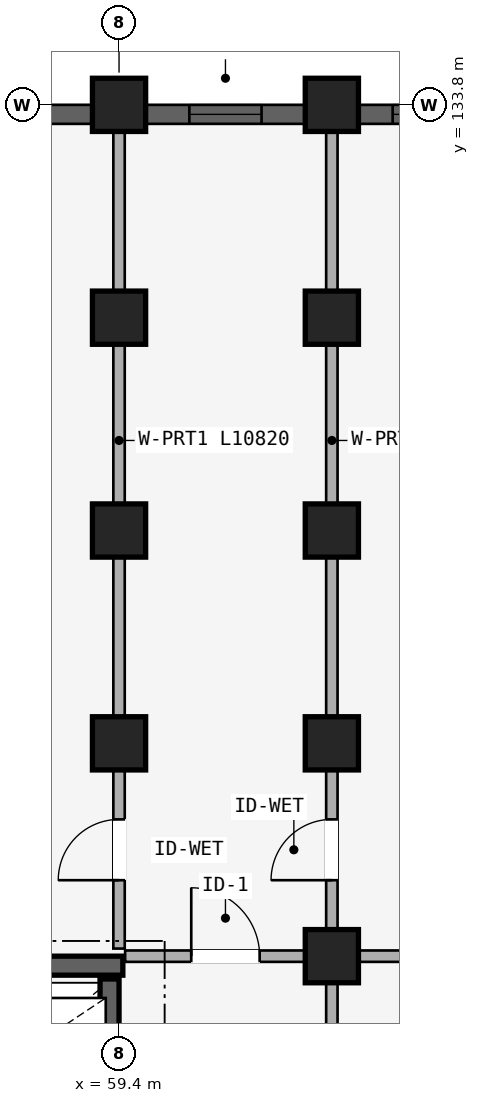
"""IFC4 building model, lengths in metres.
Left out: names, types, materials, properties, quantities, classifications, styles, units other than length and angle.
Written with IfcOpenShell. Run it as: python <this file> out.ifc"""

import sys

from ifc_helpers import new_model, si_unit, direction, frame, frame_2d, origin, origin_2d, place, context, subcontext, project, spatial, rectangle, extrude, element, fill, save


model = new_model("IFC4")
c1 = context("Model", 3, precision=1e-05, world=origin(), true_north=direction((0.0, 1.0)))
c2 = subcontext(c1, "Body", "Model", "MODEL_VIEW")
j1 = project(units=[si_unit("LENGTHUNIT", "METRE"), si_unit("PLANEANGLEUNIT", "RADIAN")], contexts=[c1])
p1 = place(None, origin())
s1 = spatial("IfcSite", under=j1, at=p1, CompositionType="ELEMENT")
p2 = place(p1, origin())
s2 = spatial("IfcBuilding", under=s1, at=p2, CompositionType="ELEMENT")
p3 = place(p2, frame((0.0, 0.0, 27.6)))
s3 = spatial("IfcBuildingStorey", under=s2, at=p3, CompositionType="ELEMENT", Elevation=27.6)
p4 = place(p3, frame((56.65, 122.475, 0.0), z_axis=(0.0, 0.0, 1.0), x_axis=(1.0, 0.0, 0.0)))
e1 = element("IfcWall", 1, at=p4, inside=s3, PredefinedType="SHEAR", context=c2, shape_type="SweptSolid", body=[
    extrude(rectangle(XDim=2.8, YDim=0.25, at=frame_2d((1.4, 0.0))), origin(), (0.0, 0.0, 1.0), 2.93),
])
p5 = place(p3, frame((59.275, 120.15, 0.0), z_axis=(0.0, 0.0, 1.0), x_axis=(0.0, 1.0, 0.0)))
e2 = element("IfcWall", 2, at=p5, inside=s3, PredefinedType="SHEAR", context=c2, shape_type="SweptSolid", body=[
    extrude(rectangle(XDim=2.15, YDim=0.25, at=frame_2d((1.075, 0.0))), origin(), (0.0, 0.0, 1.0), 2.93),
])
for number, where, z_axis, x_axis in (
    (3, (59.4, 125.4, 0.0), (0.0, 0.0, 1.0), (1.0, 0.0, 0.0)),
    (4, (59.4, 128.2, 0.0), (0.0, 0.0, 1.0), (1.0, 0.0, 0.0)),
    (5, (59.4, 131.0, 0.0), (0.0, 0.0, 1.0), (1.0, 0.0, 0.0)),
    (6, (59.4, 133.8, 0.0), (0.0, 0.0, 1.0), (1.0, 0.0, 0.0)),
    (7, (62.2, 122.6, 0.0), (0.0, 0.0, 1.0), (1.0, 0.0, 0.0)),
    (8, (62.2, 125.4, 0.0), (0.0, 0.0, 1.0), (1.0, 0.0, 0.0)),
    (9, (62.2, 128.2, 0.0), (0.0, 0.0, 1.0), (1.0, 0.0, 0.0)),
    (10, (62.2, 131.0, 0.0), (0.0, 0.0, 1.0), (1.0, 0.0, 0.0)),
    (11, (62.2, 133.8, 0.0), (0.0, 0.0, 1.0), (1.0, 0.0, 0.0)),
):
    element("IfcColumn", number, at=place(p3, frame(where, z_axis=z_axis, x_axis=x_axis)), inside=s3, PredefinedType="COLUMN", context=c2, shape_type="SweptSolid", body=[
        extrude(rectangle(XDim=0.7, YDim=0.7, at=origin_2d()), origin(), (0.0, 0.0, 1.0), 2.93),
    ])
p6 = place(p3, frame((59.48, 122.6, 0.0), z_axis=(0.0, 0.0, 1.0), x_axis=(1.0, 0.0, 0.0)))
e12 = element("IfcWall", 12, at=p6, inside=s3, PredefinedType="PLUMBINGWALL", context=c2, shape_type="SweptSolid", body=[
    extrude(rectangle(XDim=2.64, YDim=0.15, at=frame_2d((1.32, 0.0))), origin(), (0.0, 0.0, 1.0), 2.372),
])
p7 = place(p6, frame((0.87, 0.0, 0.0)))
e13 = element("IfcOpeningElement", 13, at=p7, cuts=e12, PredefinedType="OPENING", context=c2, shape_type="SweptSolid", body=[
    extrude(rectangle(XDim=0.9, YDim=2.1, at=frame_2d((0.45, 1.05))), frame((0.0, 0.085, 0.0), z_axis=(0.0, -1.0, 0.0), x_axis=(1.0, 0.0, 0.0)), (0.0, 0.0, 1.0), 0.17),
])
p8 = place(p3, frame((62.28, 122.6, 0.0), z_axis=(0.0, 0.0, 1.0), x_axis=(1.0, 0.0, 0.0)))
e14 = element("IfcWall", 14, at=p8, inside=s3, PredefinedType="PLUMBINGWALL", context=c2, shape_type="SweptSolid", body=[
    extrude(rectangle(XDim=2.64, YDim=0.15, at=frame_2d((1.32, 0.0))), origin(), (0.0, 0.0, 1.0), 2.372),
])
p9 = place(p8, frame((0.92, 0.0, 0.0)))
e15 = element("IfcOpeningElement", 15, at=p9, cuts=e14, PredefinedType="OPENING", context=c2, shape_type="SweptSolid", body=[
    extrude(rectangle(XDim=0.8, YDim=2.1, at=frame_2d((0.4, 1.05))), frame((0.0, 0.085, 0.0), z_axis=(0.0, -1.0, 0.0), x_axis=(1.0, 0.0, 0.0)), (0.0, 0.0, 1.0), 0.17),
])
p10 = place(p3, frame((59.4, 122.7, 0.0), z_axis=(0.0, 0.0, 1.0), x_axis=(0.0, 1.0, 0.0)))
e16 = element("IfcWall", 16, at=p10, inside=s3, PredefinedType="PARTITIONING", context=c2, shape_type="SweptSolid", body=[
    extrude(rectangle(XDim=10.82, YDim=0.15, at=frame_2d((5.41, 0.0))), origin(), (0.0, 0.0, 1.0), 2.372),
])
p11 = place(p10, frame((0.899, 0.0, 0.0)))
e17 = element("IfcOpeningElement", 17, at=p11, cuts=e16, PredefinedType="OPENING", context=c2, shape_type="SweptSolid", body=[
    extrude(rectangle(XDim=0.8, YDim=2.1, at=frame_2d((0.4, 1.05))), frame((0.0, 0.085, 0.0), z_axis=(0.0, -1.0, 0.0), x_axis=(1.0, 0.0, 0.0)), (0.0, 0.0, 1.0), 0.17),
])
p12 = place(p3, frame((62.2, 116.05, 0.0), z_axis=(0.0, 0.0, 1.0), x_axis=(0.0, 1.0, 0.0)))
e18 = element("IfcWall", 18, at=p12, inside=s3, PredefinedType="PARTITIONING", context=c2, shape_type="SweptSolid", body=[
    extrude(rectangle(XDim=6.53, YDim=0.15, at=frame_2d((3.265, 0.0))), origin(), (0.0, 0.0, 1.0), 2.372),
])
p13 = place(p12, frame((2.815, 0.0, 0.0)))
e19 = element("IfcOpeningElement", 19, at=p13, cuts=e18, PredefinedType="OPENING", context=c2, shape_type="SweptSolid", body=[
    extrude(rectangle(XDim=0.9, YDim=2.1, at=frame_2d((0.45, 1.05))), frame((0.0, 0.085, 0.0), z_axis=(0.0, -1.0, 0.0), x_axis=(1.0, 0.0, 0.0)), (0.0, 0.0, 1.0), 0.17),
])
p14 = place(p3, frame((62.2, 122.7, 0.0), z_axis=(0.0, 0.0, 1.0), x_axis=(0.0, 1.0, 0.0)))
e20 = element("IfcWall", 20, at=p14, inside=s3, PredefinedType="PARTITIONING", context=c2, shape_type="SweptSolid", body=[
    extrude(rectangle(XDim=10.82, YDim=0.15, at=frame_2d((5.41, 0.0))), origin(), (0.0, 0.0, 1.0), 2.372),
])
p15 = place(p14, frame((0.899, 0.0, 0.0)))
e21 = element("IfcOpeningElement", 21, at=p15, cuts=e20, PredefinedType="OPENING", context=c2, shape_type="SweptSolid", body=[
    extrude(rectangle(XDim=0.8, YDim=2.1, at=frame_2d((0.4, 1.05))), frame((0.0, 0.085, 0.0), z_axis=(0.0, -1.0, 0.0), x_axis=(1.0, 0.0, 0.0)), (0.0, 0.0, 1.0), 0.17),
])
p16 = place(p3, frame((54.154, 133.675, 0.0), z_axis=(0.0, 0.0, 1.0), x_axis=(1.0, 0.0, 0.0)))
e22 = element("IfcWall", 22, at=p16, inside=s3, PredefinedType="STANDARD", context=c2, shape_type="SweptSolid", body=[
    extrude(rectangle(XDim=4.893, YDim=0.25, at=frame_2d((2.446, 0.0))), origin(), (0.0, 0.0, 1.0), 2.472),
])
p17 = place(p16, frame((1.896, 0.0, 0.822)))
e23 = element("IfcOpeningElement", 23, at=p17, cuts=e22, PredefinedType="OPENING", context=c2, shape_type="SweptSolid", body=[
    extrude(rectangle(XDim=1.1, YDim=1.45, at=frame_2d((0.55, 0.725))), frame((0.0, 0.135, 0.0), z_axis=(0.0, -1.0, 0.0), x_axis=(1.0, 0.0, 0.0)), (0.0, 0.0, 1.0), 0.27),
])
p18 = place(p3, frame((59.753, 133.675, 0.0), z_axis=(0.0, 0.0, 1.0), x_axis=(1.0, 0.0, 0.0)))
e24 = element("IfcWall", 24, at=p18, inside=s3, PredefinedType="STANDARD", context=c2, shape_type="SweptSolid", body=[
    extrude(rectangle(XDim=2.093, YDim=0.25, at=frame_2d((1.046, 0.0))), origin(), (0.0, 0.0, 1.0), 2.472),
])
p19 = place(p18, frame((0.572, 0.0, 0.88)))
e25 = element("IfcOpeningElement", 25, at=p19, cuts=e24, PredefinedType="OPENING", context=c2, shape_type="SweptSolid", body=[
    extrude(rectangle(XDim=0.95, YDim=1.35, at=frame_2d((0.475, 0.675))), frame((0.0, 0.135, 0.0), z_axis=(0.0, -1.0, 0.0), x_axis=(1.0, 0.0, 0.0)), (0.0, 0.0, 1.0), 0.27),
])
p20 = place(p3, frame((62.553, 133.675, 0.0), z_axis=(0.0, 0.0, 1.0), x_axis=(1.0, 0.0, 0.0)))
e26 = element("IfcWall", 26, at=p20, inside=s3, PredefinedType="STANDARD", context=c2, shape_type="SweptSolid", body=[
    extrude(rectangle(XDim=2.093, YDim=0.25, at=frame_2d((1.046, 0.0))), origin(), (0.0, 0.0, 1.0), 2.472),
])
p21 = place(p20, frame((0.447, 0.0, 0.772)))
e27 = element("IfcOpeningElement", 27, at=p21, cuts=e26, PredefinedType="OPENING", context=c2, shape_type="SweptSolid", body=[
    extrude(rectangle(XDim=1.2, YDim=1.5, at=frame_2d((0.6, 0.75))), frame((0.0, 0.135, 0.0), z_axis=(0.0, -1.0, 0.0), x_axis=(1.0, 0.0, 0.0)), (0.0, 0.0, 1.0), 0.27),
])
p22 = place(p19, origin())
e28 = element("IfcWindow", 28, at=p22, inside=s3, PartitioningType="SINGLE_PANEL", PredefinedType="WINDOW", context=c2, shape_type="SweptSolid", body=[
    extrude(rectangle(XDim=0.95, YDim=1.35, at=frame_2d((0.475, 0.675))), frame((0.0, 0.03, 0.0), z_axis=(0.0, -1.0, 0.0), x_axis=(1.0, 0.0, 0.0)), (0.0, 0.0, 1.0), 0.06),
])
fill(e25, e28)
p23 = place(p21, origin())
e29 = element("IfcWindow", 29, at=p23, inside=s3, PartitioningType="SINGLE_PANEL", PredefinedType="WINDOW", context=c2, shape_type="SweptSolid", body=[
    extrude(rectangle(XDim=1.2, YDim=1.5, at=frame_2d((0.6, 0.75))), frame((0.0, 0.03, 0.0), z_axis=(0.0, -1.0, 0.0), x_axis=(1.0, 0.0, 0.0)), (0.0, 0.0, 1.0), 0.06),
])
fill(e27, e29)
p24 = place(p7, frame((0.9, 0.0, 0.0), z_axis=(0.0, 0.0, 1.0), x_axis=(-1.0, 0.0, 0.0)))
e30 = element("IfcDoor", 30, at=p24, inside=s3, OperationType="SINGLE_SWING_RIGHT", PredefinedType="DOOR", context=c2, shape_type="SweptSolid", body=[
    extrude(rectangle(XDim=0.9, YDim=2.1, at=frame_2d((0.45, 1.05))), frame((0.0, 0.025, 0.0), z_axis=(0.0, -1.0, 0.0), x_axis=(1.0, 0.0, 0.0)), (0.0, 0.0, 1.0), 0.05),
])
fill(e13, e30)
p25 = place(p11, origin())
e31 = element("IfcDoor", 31, at=p25, inside=s3, OperationType="SINGLE_SWING_LEFT", PredefinedType="DOOR", context=c2, shape_type="SweptSolid", body=[
    extrude(rectangle(XDim=0.8, YDim=2.1, at=frame_2d((0.4, 1.05))), frame((0.0, 0.025, 0.0), z_axis=(0.0, -1.0, 0.0), x_axis=(1.0, 0.0, 0.0)), (0.0, 0.0, 1.0), 0.05),
])
fill(e17, e31)
p26 = place(p15, frame((0.8, 0.0, 0.0), z_axis=(0.0, 0.0, 1.0), x_axis=(-1.0, 0.0, 0.0)))
e32 = element("IfcDoor", 32, at=p26, inside=s3, OperationType="SINGLE_SWING_RIGHT", PredefinedType="DOOR", context=c2, shape_type="SweptSolid", body=[
    extrude(rectangle(XDim=0.8, YDim=2.1, at=frame_2d((0.4, 1.05))), frame((0.0, 0.025, 0.0), z_axis=(0.0, -1.0, 0.0), x_axis=(1.0, 0.0, 0.0)), (0.0, 0.0, 1.0), 0.05),
])
fill(e21, e32)
save(model, sys.argv[1])
